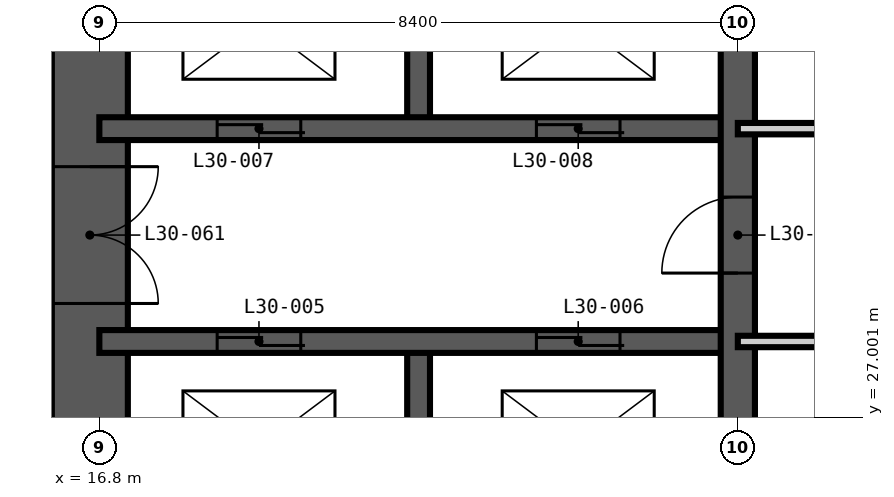
"""IFC4 building model, lengths in metres.
Left out: names, types, materials, properties, quantities, classifications, styles, units other than length and angle.
Written with IfcOpenShell. Run it as: python <this file> out.ifc"""

import sys

from ifc_helpers import new_model, si_unit, direction, frame, frame_2d, origin, place, context, subcontext, project, spatial, rectangle, extrude, element, fill, save


model = new_model("IFC4")
c1 = context("Model", 3, precision=1e-05, world=origin(), true_north=direction((0.0, 1.0)))
c2 = subcontext(c1, "Body", "Model", "MODEL_VIEW")
j1 = project(units=[si_unit("LENGTHUNIT", "METRE"), si_unit("PLANEANGLEUNIT", "RADIAN")], contexts=[c1])
p1 = place(None, origin())
s1 = spatial("IfcSite", under=j1, at=p1, CompositionType="ELEMENT")
p2 = place(p1, origin())
s2 = spatial("IfcBuilding", under=s1, at=p2, CompositionType="ELEMENT")
p3 = place(p2, frame((0.0, 0.0, 118.8)))
s3 = spatial("IfcBuildingStorey", under=s2, at=p3, CompositionType="ELEMENT", Elevation=118.8)
p4 = place(p3, frame((16.675, 41.625, -0.35), z_axis=(0.0, 0.0, 1.0), x_axis=(0.0, -1.0, 0.0)))
e1 = element("IfcWall", 1, at=p4, inside=s3, PredefinedType="SHEAR", context=c2, shape_type="SweptSolid", body=[
    extrude(rectangle(XDim=24.45, YDim=1.0, at=frame_2d((12.225, 0.0))), origin(), (0.0, 0.0, 1.0), 3.6),
])
p5 = place(p4, frame((11.325, 0.0, 0.35)))
e2 = element("IfcOpeningElement", 2, at=p5, cuts=e1, PredefinedType="OPENING", context=c2, shape_type="SweptSolid", body=[
    extrude(rectangle(XDim=1.8, YDim=2.2, at=frame_2d((0.9, 1.1))), frame((0.0, 0.51, 0.0), z_axis=(0.0, -1.0, 0.0), x_axis=(1.0, 0.0, 0.0)), (0.0, 0.0, 1.0), 1.02),
])
p6 = place(p4, frame((20.125, 0.0, 0.35)))
e3 = element("IfcOpeningElement", 3, at=p6, cuts=e1, PredefinedType="OPENING", context=c2, shape_type="SweptSolid", body=[
    extrude(rectangle(XDim=1.0, YDim=2.1, at=frame_2d((0.5, 1.05))), frame((0.0, 0.51, 0.0), z_axis=(0.0, -1.0, 0.0), x_axis=(1.0, 0.0, 0.0)), (0.0, 0.0, 1.0), 1.02),
])
p7 = place(p4, frame((5.425, 0.0, 0.35)))
e4 = element("IfcOpeningElement", 4, at=p7, cuts=e1, PredefinedType="OPENING", context=c2, shape_type="SweptSolid", body=[
    extrude(rectangle(XDim=1.0, YDim=2.1, at=frame_2d((0.5, 1.05))), frame((0.0, 0.51, 0.0), z_axis=(0.0, -1.0, 0.0), x_axis=(1.0, 0.0, 0.0)), (0.0, 0.0, 1.0), 1.02),
])
p8 = place(p3, frame((21.0, 22.4, -0.35), z_axis=(0.0, 0.0, 1.0), x_axis=(0.0, 1.0, 0.0)))
e5 = element("IfcWall", 5, at=p8, inside=s3, PredefinedType="SHEAR", context=c2, shape_type="SweptSolid", body=[
    extrude(rectangle(XDim=5.6, YDim=0.3, at=frame_2d((2.8, 0.0))), origin(), (0.0, 0.0, 1.0), 3.6),
])
p9 = place(p3, frame((21.0, 30.8, -0.35), z_axis=(0.0, 0.0, 1.0), x_axis=(0.0, 1.0, 0.0)))
e6 = element("IfcWall", 6, at=p9, inside=s3, PredefinedType="SHEAR", context=c2, shape_type="SweptSolid", body=[
    extrude(rectangle(XDim=2.8, YDim=0.3, at=frame_2d((1.4, 0.0))), origin(), (0.0, 0.0, 1.0), 3.6),
])
p10 = place(p3, frame((16.8, 28.0, -0.35), z_axis=(0.0, 0.0, 1.0), x_axis=(1.0, 0.0, 0.0)))
e7 = element("IfcWall", 7, at=p10, inside=s3, PredefinedType="SHEAR", context=c2, shape_type="SweptSolid", body=[
    extrude(rectangle(XDim=8.4, YDim=0.3, at=frame_2d((4.2, 0.0))), origin(), (0.0, 0.0, 1.0), 3.6),
])
p11 = place(p10, frame((1.55, 0.0, 0.35)))
e8 = element("IfcOpeningElement", 8, at=p11, cuts=e7, PredefinedType="OPENING", context=c2, shape_type="SweptSolid", body=[
    extrude(rectangle(XDim=1.1, YDim=2.2, at=frame_2d((0.55, 1.1))), frame((0.0, 0.16, 0.0), z_axis=(0.0, -1.0, 0.0), x_axis=(1.0, 0.0, 0.0)), (0.0, 0.0, 1.0), 0.32),
])
p12 = place(p10, frame((5.75, 0.0, 0.35)))
e9 = element("IfcOpeningElement", 9, at=p12, cuts=e7, PredefinedType="OPENING", context=c2, shape_type="SweptSolid", body=[
    extrude(rectangle(XDim=1.1, YDim=2.2, at=frame_2d((0.55, 1.1))), frame((0.0, 0.16, 0.0), z_axis=(0.0, -1.0, 0.0), x_axis=(1.0, 0.0, 0.0)), (0.0, 0.0, 1.0), 0.32),
])
p13 = place(p3, frame((16.8, 30.8, -0.35), z_axis=(0.0, 0.0, 1.0), x_axis=(1.0, 0.0, 0.0)))
e10 = element("IfcWall", 10, at=p13, inside=s3, PredefinedType="SHEAR", context=c2, shape_type="SweptSolid", body=[
    extrude(rectangle(XDim=8.4, YDim=0.3, at=frame_2d((4.2, 0.0))), origin(), (0.0, 0.0, 1.0), 3.6),
])
p14 = place(p13, frame((1.55, 0.0, 0.35)))
e11 = element("IfcOpeningElement", 11, at=p14, cuts=e10, PredefinedType="OPENING", context=c2, shape_type="SweptSolid", body=[
    extrude(rectangle(XDim=1.1, YDim=2.2, at=frame_2d((0.55, 1.1))), frame((0.0, 0.16, 0.0), z_axis=(0.0, -1.0, 0.0), x_axis=(1.0, 0.0, 0.0)), (0.0, 0.0, 1.0), 0.32),
])
p15 = place(p13, frame((5.75, 0.0, 0.35)))
e12 = element("IfcOpeningElement", 12, at=p15, cuts=e10, PredefinedType="OPENING", context=c2, shape_type="SweptSolid", body=[
    extrude(rectangle(XDim=1.1, YDim=2.2, at=frame_2d((0.55, 1.1))), frame((0.0, 0.16, 0.0), z_axis=(0.0, -1.0, 0.0), x_axis=(1.0, 0.0, 0.0)), (0.0, 0.0, 1.0), 0.32),
])
p16 = place(p3, frame((25.2, 16.8, -0.35), z_axis=(0.0, 0.0, 1.0), x_axis=(0.0, 1.0, 0.0)))
e13 = element("IfcWall", 13, at=p16, inside=s3, PredefinedType="SHEAR", context=c2, shape_type="SweptSolid", body=[
    extrude(rectangle(XDim=25.2, YDim=0.45, at=frame_2d((12.6, 0.0))), origin(), (0.0, 0.0, 1.0), 3.6),
])
p17 = place(p16, frame((12.1, 0.0, 0.35)))
e14 = element("IfcOpeningElement", 14, at=p17, cuts=e13, PredefinedType="OPENING", context=c2, shape_type="SweptSolid", body=[
    extrude(rectangle(XDim=1.0, YDim=2.1, at=frame_2d((0.5, 1.05))), frame((0.0, 0.235, 0.0), z_axis=(0.0, -1.0, 0.0), x_axis=(1.0, 0.0, 0.0)), (0.0, 0.0, 1.0), 0.47),
])
p18 = place(p3, frame((25.2, 28.0, 0.0), z_axis=(0.0, 0.0, 1.0), x_axis=(1.0, 0.0, 0.0)))
e15 = element("IfcWall", 15, at=p18, inside=s3, PredefinedType="PARTITIONING", context=c2, shape_type="SweptSolid", body=[
    extrude(rectangle(XDim=8.4, YDim=0.15, at=frame_2d((4.2, 0.0))), origin(), (0.0, 0.0, 1.0), 3.25),
])
p19 = place(p18, frame((1.6, 0.0, 0.0)))
e16 = element("IfcOpeningElement", 16, at=p19, cuts=e15, PredefinedType="OPENING", context=c2, shape_type="SweptSolid", body=[
    extrude(rectangle(XDim=1.0, YDim=2.1, at=frame_2d((0.5, 1.05))), frame((0.0, 0.085, 0.0), z_axis=(0.0, -1.0, 0.0), x_axis=(1.0, 0.0, 0.0)), (0.0, 0.0, 1.0), 0.17),
])
p20 = place(p18, frame((5.8, 0.0, 0.0)))
e17 = element("IfcOpeningElement", 17, at=p20, cuts=e15, PredefinedType="OPENING", context=c2, shape_type="SweptSolid", body=[
    extrude(rectangle(XDim=1.0, YDim=2.1, at=frame_2d((0.5, 1.05))), frame((0.0, 0.085, 0.0), z_axis=(0.0, -1.0, 0.0), x_axis=(1.0, 0.0, 0.0)), (0.0, 0.0, 1.0), 0.17),
])
p21 = place(p3, frame((25.2, 30.8, 0.0), z_axis=(0.0, 0.0, 1.0), x_axis=(1.0, 0.0, 0.0)))
e18 = element("IfcWall", 18, at=p21, inside=s3, PredefinedType="PARTITIONING", context=c2, shape_type="SweptSolid", body=[
    extrude(rectangle(XDim=8.4, YDim=0.15, at=frame_2d((4.2, 0.0))), origin(), (0.0, 0.0, 1.0), 3.25),
])
p22 = place(p21, frame((3.7, 0.0, 0.0)))
e19 = element("IfcOpeningElement", 19, at=p22, cuts=e18, PredefinedType="OPENING", context=c2, shape_type="SweptSolid", body=[
    extrude(rectangle(XDim=1.0, YDim=2.1, at=frame_2d((0.5, 1.05))), frame((0.0, 0.085, 0.0), z_axis=(0.0, -1.0, 0.0), x_axis=(1.0, 0.0, 0.0)), (0.0, 0.0, 1.0), 0.17),
])
p23 = place(p11, origin())
e20 = element("IfcDoor", 20, at=p23, inside=s3, OperationType="DOUBLE_DOOR_SLIDING", PredefinedType="DOOR", context=c2, shape_type="SweptSolid", body=[
    extrude(rectangle(XDim=1.1, YDim=2.2, at=frame_2d((0.55, 1.1))), frame((0.0, 0.025, 0.0), z_axis=(0.0, -1.0, 0.0), x_axis=(1.0, 0.0, 0.0)), (0.0, 0.0, 1.0), 0.05),
])
fill(e8, e20)
p24 = place(p12, origin())
e21 = element("IfcDoor", 21, at=p24, inside=s3, OperationType="DOUBLE_DOOR_SLIDING", PredefinedType="DOOR", context=c2, shape_type="SweptSolid", body=[
    extrude(rectangle(XDim=1.1, YDim=2.2, at=frame_2d((0.55, 1.1))), frame((0.0, 0.025, 0.0), z_axis=(0.0, -1.0, 0.0), x_axis=(1.0, 0.0, 0.0)), (0.0, 0.0, 1.0), 0.05),
])
fill(e9, e21)
p25 = place(p14, origin())
e22 = element("IfcDoor", 22, at=p25, inside=s3, OperationType="DOUBLE_DOOR_SLIDING", PredefinedType="DOOR", context=c2, shape_type="SweptSolid", body=[
    extrude(rectangle(XDim=1.1, YDim=2.2, at=frame_2d((0.55, 1.1))), frame((0.0, 0.025, 0.0), z_axis=(0.0, -1.0, 0.0), x_axis=(1.0, 0.0, 0.0)), (0.0, 0.0, 1.0), 0.05),
])
fill(e11, e22)
p26 = place(p15, origin())
e23 = element("IfcDoor", 23, at=p26, inside=s3, OperationType="DOUBLE_DOOR_SLIDING", PredefinedType="DOOR", context=c2, shape_type="SweptSolid", body=[
    extrude(rectangle(XDim=1.1, YDim=2.2, at=frame_2d((0.55, 1.1))), frame((0.0, 0.025, 0.0), z_axis=(0.0, -1.0, 0.0), x_axis=(1.0, 0.0, 0.0)), (0.0, 0.0, 1.0), 0.05),
])
fill(e12, e23)
p27 = place(p5, origin())
e24 = element("IfcDoor", 24, at=p27, inside=s3, OperationType="DOUBLE_DOOR_DOUBLE_SWING", PredefinedType="DOOR", context=c2, shape_type="SweptSolid", body=[
    extrude(rectangle(XDim=1.8, YDim=2.2, at=frame_2d((0.9, 1.1))), frame((0.0, 0.025, 0.0), z_axis=(0.0, -1.0, 0.0), x_axis=(1.0, 0.0, 0.0)), (0.0, 0.0, 1.0), 0.05),
])
fill(e2, e24)
p28 = place(p17, origin())
e25 = element("IfcDoor", 25, at=p28, inside=s3, OperationType="SINGLE_SWING_LEFT", PredefinedType="DOOR", context=c2, shape_type="SweptSolid", body=[
    extrude(rectangle(XDim=1.0, YDim=2.1, at=frame_2d((0.5, 1.05))), frame((0.0, 0.025, 0.0), z_axis=(0.0, -1.0, 0.0), x_axis=(1.0, 0.0, 0.0)), (0.0, 0.0, 1.0), 0.05),
])
fill(e14, e25)
save(model, sys.argv[1])
